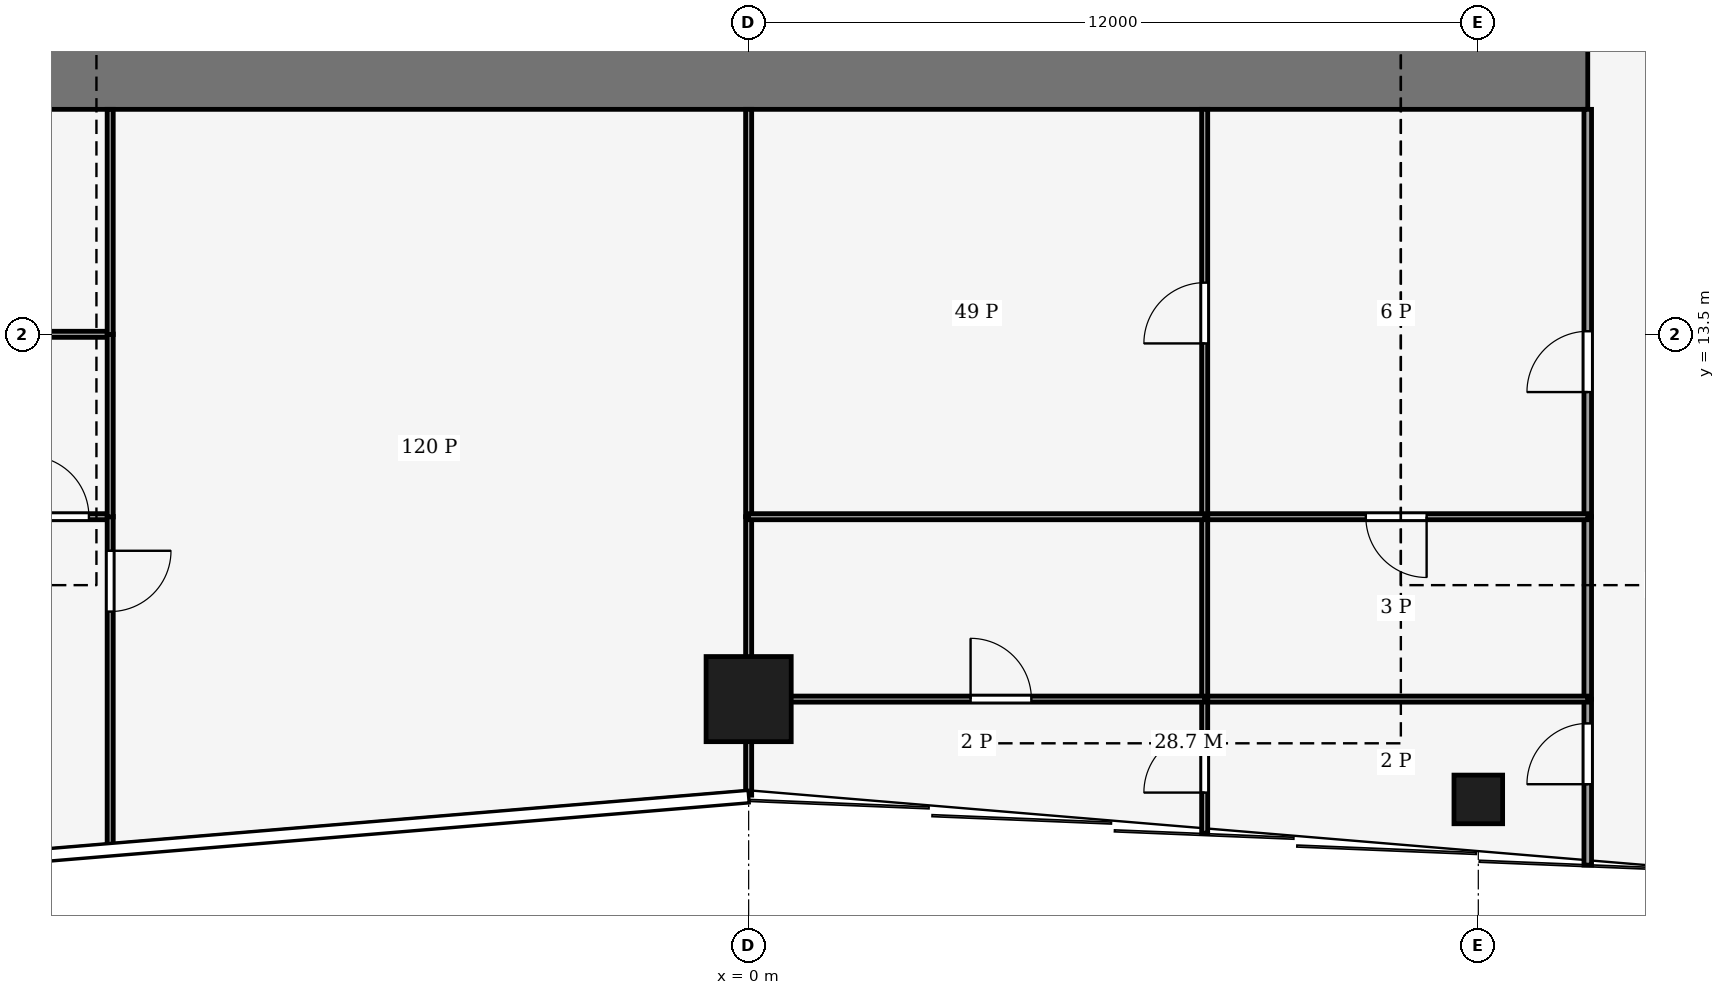
"""IFC4 building model, lengths in metres.
Left out: names, types, materials, properties, quantities, classifications, styles, units other than length and angle.
Written with IfcOpenShell. Run it as: python <this file> out.ifc"""

import sys

from ifc_helpers import new_model, si_unit, direction, frame, frame_2d, origin, origin_2d, place, context, subcontext, project, spatial, rectangle, hollow_rectangle, extrude, element, fill, save


model = new_model("IFC4")
c1 = context("Model", 3, precision=1e-05, world=origin(), true_north=direction((0.0, 1.0)))
c2 = subcontext(c1, "Body", "Model", "MODEL_VIEW")
j1 = project(units=[si_unit("LENGTHUNIT", "METRE"), si_unit("PLANEANGLEUNIT", "RADIAN")], contexts=[c1])
p1 = place(None, origin())
s1 = spatial("IfcSite", under=j1, at=p1, CompositionType="ELEMENT")
p2 = place(p1, origin())
s2 = spatial("IfcBuilding", under=s1, at=p2, CompositionType="ELEMENT")
p3 = place(p2, frame((0.0, 0.0, 90.0)))
s3 = spatial("IfcBuildingStorey", under=s2, at=p3, CompositionType="ELEMENT", Elevation=90.0)
p4 = place(p3, frame((-13.8, 17.8, -0.13), z_axis=(0.0, 0.0, 1.0), x_axis=(1.0, 0.0, 0.0)))
e1 = element("IfcWall", 1, at=p4, inside=s3, PredefinedType="SHEAR", context=c2, shape_type="SweptSolid", body=[
    extrude(rectangle(XDim=27.6, YDim=1.2, at=frame_2d((13.8, 0.0))), origin(), (0.0, 0.0, 1.0), 4.0),
])
p5 = place(p3, frame((0.0, 7.5, 0.0), z_axis=(0.0, 0.0, 1.0), x_axis=(1.0, 0.0, 0.0)))
e2 = element("IfcColumn", 2, at=p5, inside=s3, PredefinedType="COLUMN", context=c2, shape_type="SweptSolid", body=[
    extrude(hollow_rectangle(XDim=1.4, YDim=1.4, WallThickness=0.08, at=origin_2d()), origin(), (0.0, 0.0, 1.0), 4.0),
])
p6 = place(p3, frame((12.0, 5.85, 0.0), z_axis=(0.0, 0.0, 1.0), x_axis=(1.0, 0.0, 0.0)))
e3 = element("IfcColumn", 3, at=p6, inside=s3, PredefinedType="COLUMN", context=c2, shape_type="SweptSolid", body=[
    extrude(hollow_rectangle(XDim=0.8, YDim=0.8, WallThickness=0.04, at=origin_2d()), origin(), (0.0, 0.0, 1.0), 4.0),
])
p7 = place(p3, frame((13.8, 4.77, 0.0), z_axis=(0.0, 0.0, 1.0), x_axis=(0.0, 1.0, 0.0)))
e4 = element("IfcWall", 4, at=p7, inside=s3, PredefinedType="PARTITIONING", context=c2, shape_type="SweptSolid", body=[
    extrude(rectangle(XDim=2.73, YDim=0.125, at=frame_2d((1.365, 0.0))), origin(), (0.0, 0.0, 1.0), 3.04),
])
p8 = place(p7, frame((1.33, 0.0, 0.0)))
e5 = element("IfcOpeningElement", 5, at=p8, cuts=e4, PredefinedType="OPENING", context=c2, shape_type="SweptSolid", body=[
    extrude(rectangle(XDim=1.0, YDim=2.1, at=frame_2d((0.5, 1.05))), frame((0.0, 0.073, 0.0), z_axis=(0.0, -1.0, 0.0), x_axis=(1.0, 0.0, 0.0)), (0.0, 0.0, 1.0), 0.145),
])
p9 = place(p3, frame((13.8, 10.5, 0.0), z_axis=(0.0, 0.0, 1.0), x_axis=(0.0, -1.0, 0.0)))
e6 = element("IfcWall", 6, at=p9, inside=s3, PredefinedType="PARTITIONING", context=c2, shape_type="SweptSolid", body=[
    extrude(rectangle(XDim=3.0, YDim=0.125, at=frame_2d((1.5, 0.0))), origin(), (0.0, 0.0, 1.0), 3.87),
])
p10 = place(p3, frame((13.8, 10.5, 0.0), z_axis=(0.0, 0.0, 1.0), x_axis=(0.0, 1.0, 0.0)))
e7 = element("IfcWall", 7, at=p10, inside=s3, PredefinedType="PARTITIONING", context=c2, shape_type="SweptSolid", body=[
    extrude(rectangle(XDim=6.7, YDim=0.125, at=frame_2d((3.35, 0.0))), origin(), (0.0, 0.0, 1.0), 3.14),
])
p11 = place(p10, frame((2.05, 0.0, 0.0)))
e8 = element("IfcOpeningElement", 8, at=p11, cuts=e7, PredefinedType="OPENING", context=c2, shape_type="SweptSolid", body=[
    extrude(rectangle(XDim=1.0, YDim=2.1, at=frame_2d((0.5, 1.05))), frame((0.0, 0.073, 0.0), z_axis=(0.0, -1.0, 0.0), x_axis=(1.0, 0.0, 0.0)), (0.0, 0.0, 1.0), 0.145),
])
p12 = place(p3, frame((-13.8, 10.5, 0.0), z_axis=(0.0, 0.0, 1.0), x_axis=(1.0, 0.0, 0.0)))
e9 = element("IfcWall", 9, at=p12, inside=s3, PredefinedType="PARTITIONING", context=c2, shape_type="SweptSolid", body=[
    extrude(rectangle(XDim=3.3, YDim=0.1, at=frame_2d((1.65, 0.0))), origin(), (0.0, 0.0, 1.0), 3.44),
])
p13 = place(p12, frame((1.95, 0.0, 0.0)))
e10 = element("IfcOpeningElement", 10, at=p13, cuts=e9, PredefinedType="OPENING", context=c2, shape_type="SweptSolid", body=[
    extrude(rectangle(XDim=1.0, YDim=2.1, at=frame_2d((0.5, 1.05))), frame((0.0, 0.06, 0.0), z_axis=(0.0, -1.0, 0.0), x_axis=(1.0, 0.0, 0.0)), (0.0, 0.0, 1.0), 0.12),
])
p14 = place(p3, frame((-10.5, 10.504, 0.0), z_axis=(0.0, 0.0, 1.0), x_axis=(0.0, -1.0, 0.0)))
e11 = element("IfcWall", 11, at=p14, inside=s3, PredefinedType="PARTITIONING", context=c2, shape_type="SweptSolid", body=[
    extrude(rectangle(XDim=5.459, YDim=0.1, at=frame_2d((2.729, 0.0))), origin(), (0.0, 0.0, 1.0), 3.04),
])
p15 = place(p14, frame((0.564, 0.0, 0.0)))
e12 = element("IfcOpeningElement", 12, at=p15, cuts=e11, PredefinedType="OPENING", context=c2, shape_type="SweptSolid", body=[
    extrude(rectangle(XDim=1.0, YDim=2.1, at=frame_2d((0.5, 1.05))), frame((0.0, 0.06, 0.0), z_axis=(0.0, -1.0, 0.0), x_axis=(1.0, 0.0, 0.0)), (0.0, 0.0, 1.0), 0.12),
])
p16 = place(p3, frame((-10.5, 13.5, 0.0), z_axis=(0.0, 0.0, 1.0), x_axis=(-1.0, 0.0, 0.0)))
e13 = element("IfcWall", 13, at=p16, inside=s3, PredefinedType="PARTITIONING", context=c2, shape_type="SweptSolid", body=[
    extrude(rectangle(XDim=3.3, YDim=0.1, at=frame_2d((1.65, 0.0))), origin(), (0.0, 0.0, 1.0), 3.44),
])
p17 = place(p3, frame((-10.5, 10.496, 0.0), z_axis=(0.0, 0.0, 1.0), x_axis=(0.0, 1.0, 0.0)))
e14 = element("IfcWall", 14, at=p17, inside=s3, PredefinedType="PARTITIONING", context=c2, shape_type="SweptSolid", body=[
    extrude(rectangle(XDim=3.008, YDim=0.1, at=frame_2d((1.504, 0.0))), origin(), (0.0, 0.0, 1.0), 3.87),
])
p18 = place(p3, frame((-10.5, 13.496, 0.0), z_axis=(0.0, 0.0, 1.0), x_axis=(0.0, 1.0, 0.0)))
e15 = element("IfcWall", 15, at=p18, inside=s3, PredefinedType="PARTITIONING", context=c2, shape_type="SweptSolid", body=[
    extrude(rectangle(XDim=3.704, YDim=0.1, at=frame_2d((1.852, 0.0))), origin(), (0.0, 0.0, 1.0), 3.87),
])
p19 = place(p3, frame((0.0, 5.92, 0.0), z_axis=(0.0, 0.0, 1.0), x_axis=(0.0, 1.0, 0.0)))
e16 = element("IfcWall", 16, at=p19, inside=s3, PredefinedType="PARTITIONING", context=c2, shape_type="SweptSolid", body=[
    extrude(rectangle(XDim=1.58, YDim=0.1, at=frame_2d((0.79, 0.0))), origin(), (0.0, 0.0, 1.0), 3.04),
])
p20 = place(p3, frame((0.0, 7.5, 0.0), z_axis=(0.0, 0.0, 1.0), x_axis=(0.0, 1.0, 0.0)))
e17 = element("IfcWall", 17, at=p20, inside=s3, PredefinedType="PARTITIONING", context=c2, shape_type="SweptSolid", body=[
    extrude(rectangle(XDim=3.0, YDim=0.1, at=frame_2d((1.5, 0.0))), origin(), (0.0, 0.0, 1.0), 3.48),
])
p21 = place(p3, frame((0.0, 10.5, 0.0), z_axis=(0.0, 0.0, 1.0), x_axis=(0.0, 1.0, 0.0)))
e18 = element("IfcWall", 18, at=p21, inside=s3, PredefinedType="PARTITIONING", context=c2, shape_type="SweptSolid", body=[
    extrude(rectangle(XDim=6.7, YDim=0.1, at=frame_2d((3.35, 0.0))), origin(), (0.0, 0.0, 1.0), 3.48),
])
p22 = place(p3, frame((13.8, 7.5, 0.0), z_axis=(0.0, 0.0, 1.0), x_axis=(-1.0, 0.0, 0.0)))
e19 = element("IfcWall", 19, at=p22, inside=s3, PredefinedType="PARTITIONING", context=c2, shape_type="SweptSolid", body=[
    extrude(rectangle(XDim=6.3, YDim=0.1, at=frame_2d((3.15, 0.0))), origin(), (0.0, 0.0, 1.0), 3.39),
])
p23 = place(p3, frame((7.5, 5.295, 0.0), z_axis=(0.0, 0.0, 1.0), x_axis=(0.0, 1.0, 0.0)))
e20 = element("IfcWall", 20, at=p23, inside=s3, PredefinedType="PARTITIONING", context=c2, shape_type="SweptSolid", body=[
    extrude(rectangle(XDim=2.205, YDim=0.1, at=frame_2d((1.103, 0.0))), origin(), (0.0, 0.0, 1.0), 3.04),
])
p24 = place(p23, frame((0.667, 0.0, 0.0)))
e21 = element("IfcOpeningElement", 21, at=p24, cuts=e20, PredefinedType="OPENING", context=c2, shape_type="SweptSolid", body=[
    extrude(rectangle(XDim=1.0, YDim=2.1, at=frame_2d((0.5, 1.05))), frame((0.0, 0.06, 0.0), z_axis=(0.0, -1.0, 0.0), x_axis=(1.0, 0.0, 0.0)), (0.0, 0.0, 1.0), 0.12),
])
p25 = place(p3, frame((13.8, 10.5, 0.0), z_axis=(0.0, 0.0, 1.0), x_axis=(-1.0, 0.0, 0.0)))
e22 = element("IfcWall", 22, at=p25, inside=s3, PredefinedType="PARTITIONING", context=c2, shape_type="SweptSolid", body=[
    extrude(rectangle(XDim=6.3, YDim=0.1, at=frame_2d((3.15, 0.0))), origin(), (0.0, 0.0, 1.0), 3.39),
])
p26 = place(p25, frame((2.65, 0.0, 0.0)))
e23 = element("IfcOpeningElement", 23, at=p26, cuts=e22, PredefinedType="OPENING", context=c2, shape_type="SweptSolid", body=[
    extrude(rectangle(XDim=1.0, YDim=2.1, at=frame_2d((0.5, 1.05))), frame((0.0, 0.06, 0.0), z_axis=(0.0, -1.0, 0.0), x_axis=(1.0, 0.0, 0.0)), (0.0, 0.0, 1.0), 0.12),
])
p27 = place(p3, frame((7.5, 10.5, 0.0), z_axis=(0.0, 0.0, 1.0), x_axis=(0.0, -1.0, 0.0)))
e24 = element("IfcWall", 24, at=p27, inside=s3, PredefinedType="PARTITIONING", context=c2, shape_type="SweptSolid", body=[
    extrude(rectangle(XDim=3.0, YDim=0.1, at=frame_2d((1.5, 0.0))), origin(), (0.0, 0.0, 1.0), 3.87),
])
p28 = place(p3, frame((7.5, 10.5, 0.0), z_axis=(0.0, 0.0, 1.0), x_axis=(0.0, 1.0, 0.0)))
e25 = element("IfcWall", 25, at=p28, inside=s3, PredefinedType="PARTITIONING", context=c2, shape_type="SweptSolid", body=[
    extrude(rectangle(XDim=6.7, YDim=0.1, at=frame_2d((3.35, 0.0))), origin(), (0.0, 0.0, 1.0), 3.87),
])
p29 = place(p28, frame((2.85, 0.0, 0.0)))
e26 = element("IfcOpeningElement", 26, at=p29, cuts=e25, PredefinedType="OPENING", context=c2, shape_type="SweptSolid", body=[
    extrude(rectangle(XDim=1.0, YDim=2.1, at=frame_2d((0.5, 1.05))), frame((0.0, 0.06, 0.0), z_axis=(0.0, -1.0, 0.0), x_axis=(1.0, 0.0, 0.0)), (0.0, 0.0, 1.0), 0.12),
])
p30 = place(p3, frame((0.0, 7.5, 0.0), z_axis=(0.0, 0.0, 1.0), x_axis=(1.0, 0.0, 0.0)))
e27 = element("IfcWall", 27, at=p30, inside=s3, PredefinedType="PARTITIONING", context=c2, shape_type="SweptSolid", body=[
    extrude(rectangle(XDim=7.5, YDim=0.1, at=frame_2d((3.75, 0.0))), origin(), (0.0, 0.0, 1.0), 3.44),
])
p31 = place(p30, frame((3.65, 0.0, 0.0)))
e28 = element("IfcOpeningElement", 28, at=p31, cuts=e27, PredefinedType="OPENING", context=c2, shape_type="SweptSolid", body=[
    extrude(rectangle(XDim=1.0, YDim=2.1, at=frame_2d((0.5, 1.05))), frame((0.0, 0.06, 0.0), z_axis=(0.0, -1.0, 0.0), x_axis=(1.0, 0.0, 0.0)), (0.0, 0.0, 1.0), 0.12),
])
p32 = place(p3, frame((7.5, 10.5, 0.0), z_axis=(0.0, 0.0, 1.0), x_axis=(-1.0, 0.0, 0.0)))
e29 = element("IfcWall", 29, at=p32, inside=s3, PredefinedType="PARTITIONING", context=c2, shape_type="SweptSolid", body=[
    extrude(rectangle(XDim=7.5, YDim=0.1, at=frame_2d((3.75, 0.0))), origin(), (0.0, 0.0, 1.0), 3.44),
])
p33 = place(p8, origin())
e30 = element("IfcDoor", 30, at=p33, inside=s3, OperationType="SINGLE_SWING_RIGHT", PredefinedType="DOOR", context=c2, shape_type="SweptSolid", body=[
    extrude(rectangle(XDim=1.0, YDim=2.1, at=frame_2d((0.5, 1.05))), frame((0.0, 0.025, 0.0), z_axis=(0.0, -1.0, 0.0), x_axis=(1.0, 0.0, 0.0)), (0.0, 0.0, 1.0), 0.05),
])
fill(e5, e30)
p34 = place(p11, origin())
e31 = element("IfcDoor", 31, at=p34, inside=s3, OperationType="SINGLE_SWING_LEFT", PredefinedType="DOOR", context=c2, shape_type="SweptSolid", body=[
    extrude(rectangle(XDim=1.0, YDim=2.1, at=frame_2d((0.5, 1.05))), frame((0.0, 0.025, 0.0), z_axis=(0.0, -1.0, 0.0), x_axis=(1.0, 0.0, 0.0)), (0.0, 0.0, 1.0), 0.05),
])
fill(e8, e31)
p35 = place(p13, origin())
e32 = element("IfcDoor", 32, at=p35, inside=s3, OperationType="SINGLE_SWING_RIGHT", PredefinedType="DOOR", context=c2, shape_type="SweptSolid", body=[
    extrude(rectangle(XDim=1.0, YDim=2.1, at=frame_2d((0.5, 1.05))), frame((0.0, 0.025, 0.0), z_axis=(0.0, -1.0, 0.0), x_axis=(1.0, 0.0, 0.0)), (0.0, 0.0, 1.0), 0.05),
])
fill(e10, e32)
p36 = place(p15, origin())
e33 = element("IfcDoor", 33, at=p36, inside=s3, OperationType="SINGLE_SWING_LEFT", PredefinedType="DOOR", context=c2, shape_type="SweptSolid", body=[
    extrude(rectangle(XDim=1.0, YDim=2.1, at=frame_2d((0.5, 1.05))), frame((0.0, 0.025, 0.0), z_axis=(0.0, -1.0, 0.0), x_axis=(1.0, 0.0, 0.0)), (0.0, 0.0, 1.0), 0.05),
])
fill(e12, e33)
p37 = place(p24, origin())
e34 = element("IfcDoor", 34, at=p37, inside=s3, OperationType="SINGLE_SWING_RIGHT", PredefinedType="DOOR", context=c2, shape_type="SweptSolid", body=[
    extrude(rectangle(XDim=1.0, YDim=2.1, at=frame_2d((0.5, 1.05))), frame((0.0, 0.025, 0.0), z_axis=(0.0, -1.0, 0.0), x_axis=(1.0, 0.0, 0.0)), (0.0, 0.0, 1.0), 0.05),
])
fill(e21, e34)
p38 = place(p26, origin())
e35 = element("IfcDoor", 35, at=p38, inside=s3, OperationType="SINGLE_SWING_RIGHT", PredefinedType="DOOR", context=c2, shape_type="SweptSolid", body=[
    extrude(rectangle(XDim=1.0, YDim=2.1, at=frame_2d((0.5, 1.05))), frame((0.0, 0.025, 0.0), z_axis=(0.0, -1.0, 0.0), x_axis=(1.0, 0.0, 0.0)), (0.0, 0.0, 1.0), 0.05),
])
fill(e23, e35)
p39 = place(p29, origin())
e36 = element("IfcDoor", 36, at=p39, inside=s3, OperationType="SINGLE_SWING_LEFT", PredefinedType="DOOR", context=c2, shape_type="SweptSolid", body=[
    extrude(rectangle(XDim=1.0, YDim=2.1, at=frame_2d((0.5, 1.05))), frame((0.0, 0.025, 0.0), z_axis=(0.0, -1.0, 0.0), x_axis=(1.0, 0.0, 0.0)), (0.0, 0.0, 1.0), 0.05),
])
fill(e26, e36)
p40 = place(p31, origin())
e37 = element("IfcDoor", 37, at=p40, inside=s3, OperationType="SINGLE_SWING_RIGHT", PredefinedType="DOOR", context=c2, shape_type="SweptSolid", body=[
    extrude(rectangle(XDim=1.0, YDim=2.1, at=frame_2d((0.5, 1.05))), frame((0.0, 0.025, 0.0), z_axis=(0.0, -1.0, 0.0), x_axis=(1.0, 0.0, 0.0)), (0.0, 0.0, 1.0), 0.05),
])
fill(e28, e37)
save(model, sys.argv[1])
